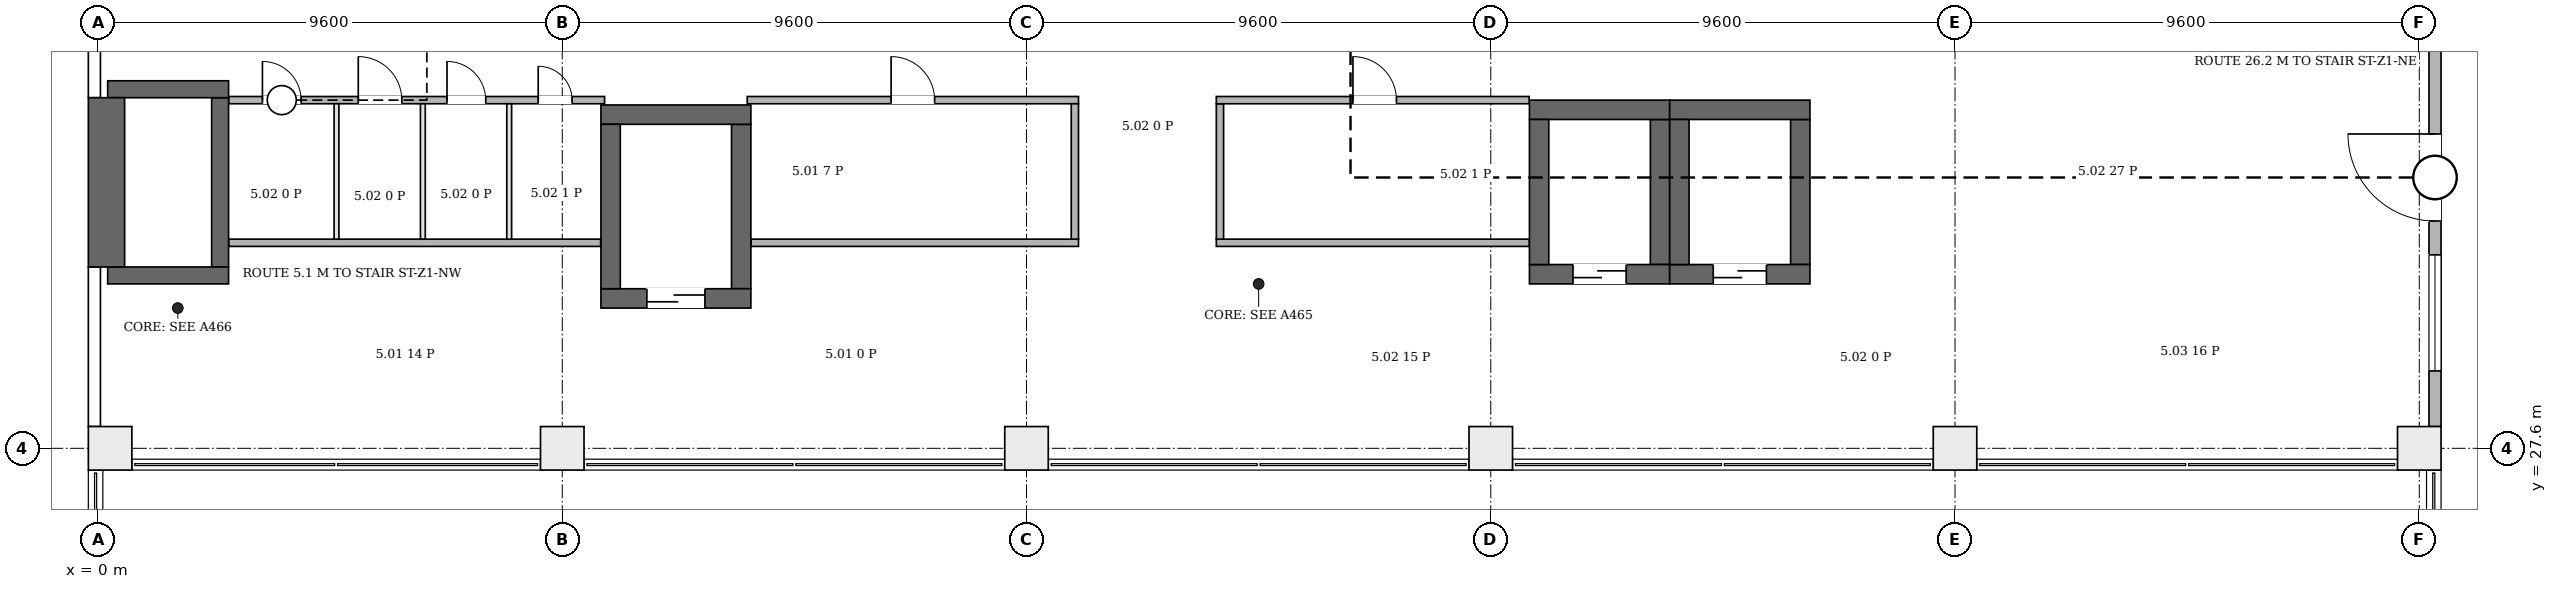
"""IFC4 building model, lengths in metres.
Left out: names, types, materials, properties, quantities, classifications, styles, units other than length and angle.
Written with IfcOpenShell. Run it as: python <this file> out.ifc"""

import sys

from ifc_helpers import new_model, si_unit, direction, frame, frame_2d, origin, origin_2d, place, context, subcontext, project, spatial, rectangle, extrude, element, fill, save


model = new_model("IFC4")
c1 = context("Model", 3, precision=1e-05, world=origin(), true_north=direction((0.0, 1.0)))
c2 = subcontext(c1, "Body", "Model", "MODEL_VIEW")
j1 = project(units=[si_unit("LENGTHUNIT", "METRE"), si_unit("PLANEANGLEUNIT", "RADIAN")], contexts=[c1])
p1 = place(None, origin())
s1 = spatial("IfcSite", under=j1, at=p1, CompositionType="ELEMENT")
p2 = place(p1, origin())
s2 = spatial("IfcBuilding", under=s1, at=p2, CompositionType="ELEMENT")
p3 = place(p2, frame((0.0, 0.0, 31.9)))
s3 = spatial("IfcBuildingStorey", under=s2, at=p3, CompositionType="ELEMENT", Elevation=31.9)
for number, where, z_axis, x_axis in (
    (1, (0.2, 31.175, 0.0), (0.0, 0.0, 1.0), (1.0, 0.0, 0.0)),
    (2, (0.2, 35.025, 0.0), (0.0, 0.0, 1.0), (1.0, 0.0, 0.0)),
):
    element("IfcWall", number, at=place(p3, frame(where, z_axis=z_axis, x_axis=x_axis)), inside=s3, PredefinedType="SHEAR", context=c2, shape_type="SweptSolid", body=[
        extrude(rectangle(XDim=2.5, YDim=0.35, at=frame_2d((1.25, 0.0))), origin(), (0.0, 0.0, 1.0), 2.2),
    ])
p4 = place(p3, frame((0.176, 31.35, 0.0), z_axis=(0.0, 0.0, 1.0), x_axis=(0.0, 1.0, 0.0)))
e3 = element("IfcWall", 3, at=p4, inside=s3, PredefinedType="SHEAR", context=c2, shape_type="SweptSolid", body=[
    extrude(rectangle(XDim=3.5, YDim=0.75, at=frame_2d((1.75, 0.0))), origin(), (0.0, 0.0, 1.0), 2.2),
])
p5 = place(p3, frame((2.525, 31.35, 0.0), z_axis=(0.0, 0.0, 1.0), x_axis=(0.0, 1.0, 0.0)))
e4 = element("IfcWall", 4, at=p5, inside=s3, PredefinedType="SHEAR", context=c2, shape_type="SweptSolid", body=[
    extrude(rectangle(XDim=3.5, YDim=0.35, at=frame_2d((1.75, 0.0))), origin(), (0.0, 0.0, 1.0), 2.2),
])
p6 = place(p3, frame((10.4, 30.7, 0.0), z_axis=(0.0, 0.0, 1.0), x_axis=(1.0, 0.0, 0.0)))
e5 = element("IfcWall", 5, at=p6, inside=s3, PredefinedType="SHEAR", context=c2, shape_type="SweptSolid", body=[
    extrude(rectangle(XDim=3.1, YDim=0.4, at=frame_2d((1.55, 0.0))), origin(), (0.0, 0.0, 1.0), 4.2),
])
p7 = place(p6, frame((0.95, 0.0, 0.0)))
e6 = element("IfcOpeningElement", 6, at=p7, cuts=e5, PredefinedType="OPENING", context=c2, shape_type="SweptSolid", body=[
    extrude(rectangle(XDim=1.2, YDim=2.1, at=frame_2d((0.6, 1.05))), frame((0.0, 0.21, 0.0), z_axis=(0.0, -1.0, 0.0), x_axis=(1.0, 0.0, 0.0)), (0.0, 0.0, 1.0), 0.42),
])
p8 = place(p3, frame((10.4, 34.5, 0.0), z_axis=(0.0, 0.0, 1.0), x_axis=(1.0, 0.0, 0.0)))
e7 = element("IfcWall", 7, at=p8, inside=s3, PredefinedType="SHEAR", context=c2, shape_type="SweptSolid", body=[
    extrude(rectangle(XDim=3.1, YDim=0.4, at=frame_2d((1.55, 0.0))), origin(), (0.0, 0.0, 1.0), 4.2),
])
for number, where, z_axis, x_axis in (
    (8, (10.6, 30.9, 0.0), (0.0, 0.0, 1.0), (0.0, 1.0, 0.0)),
    (9, (13.3, 30.9, 0.0), (0.0, 0.0, 1.0), (0.0, 1.0, 0.0)),
):
    element("IfcWall", number, at=place(p3, frame(where, z_axis=z_axis, x_axis=x_axis)), inside=s3, PredefinedType="SHEAR", context=c2, shape_type="SweptSolid", body=[
        extrude(rectangle(XDim=3.4, YDim=0.4, at=frame_2d((1.7, 0.0))), origin(), (0.0, 0.0, 1.0), 4.2),
    ])
p9 = place(p3, frame((29.6, 31.2, 0.0), z_axis=(0.0, 0.0, 1.0), x_axis=(1.0, 0.0, 0.0)))
e10 = element("IfcWall", 10, at=p9, inside=s3, PredefinedType="SHEAR", context=c2, shape_type="SweptSolid", body=[
    extrude(rectangle(XDim=2.9, YDim=0.4, at=frame_2d((1.45, 0.0))), origin(), (0.0, 0.0, 1.0), 4.2),
])
p10 = place(p9, frame((0.9, 0.0, 0.0)))
e11 = element("IfcOpeningElement", 11, at=p10, cuts=e10, PredefinedType="OPENING", context=c2, shape_type="SweptSolid", body=[
    extrude(rectangle(XDim=1.1, YDim=2.1, at=frame_2d((0.55, 1.05))), frame((0.0, 0.21, 0.0), z_axis=(0.0, -1.0, 0.0), x_axis=(1.0, 0.0, 0.0)), (0.0, 0.0, 1.0), 0.42),
])
p11 = place(p3, frame((29.6, 34.6, 0.0), z_axis=(0.0, 0.0, 1.0), x_axis=(1.0, 0.0, 0.0)))
e12 = element("IfcWall", 12, at=p11, inside=s3, PredefinedType="SHEAR", context=c2, shape_type="SweptSolid", body=[
    extrude(rectangle(XDim=2.9, YDim=0.4, at=frame_2d((1.45, 0.0))), origin(), (0.0, 0.0, 1.0), 4.2),
])
for number, where, z_axis, x_axis in (
    (13, (29.8, 31.4, 0.0), (0.0, 0.0, 1.0), (0.0, 1.0, 0.0)),
    (14, (32.3, 31.4, 0.0), (0.0, 0.0, 1.0), (0.0, 1.0, 0.0)),
):
    element("IfcWall", number, at=place(p3, frame(where, z_axis=z_axis, x_axis=x_axis)), inside=s3, PredefinedType="SHEAR", context=c2, shape_type="SweptSolid", body=[
        extrude(rectangle(XDim=3.0, YDim=0.4, at=frame_2d((1.5, 0.0))), origin(), (0.0, 0.0, 1.0), 4.2),
    ])
p12 = place(p3, frame((32.5, 31.2, 0.0), z_axis=(0.0, 0.0, 1.0), x_axis=(1.0, 0.0, 0.0)))
e15 = element("IfcWall", 15, at=p12, inside=s3, PredefinedType="SHEAR", context=c2, shape_type="SweptSolid", body=[
    extrude(rectangle(XDim=2.9, YDim=0.4, at=frame_2d((1.45, 0.0))), origin(), (0.0, 0.0, 1.0), 4.2),
])
p13 = place(p12, frame((0.9, 0.0, 0.0)))
e16 = element("IfcOpeningElement", 16, at=p13, cuts=e15, PredefinedType="OPENING", context=c2, shape_type="SweptSolid", body=[
    extrude(rectangle(XDim=1.1, YDim=2.1, at=frame_2d((0.55, 1.05))), frame((0.0, 0.21, 0.0), z_axis=(0.0, -1.0, 0.0), x_axis=(1.0, 0.0, 0.0)), (0.0, 0.0, 1.0), 0.42),
])
p14 = place(p3, frame((32.5, 34.6, 0.0), z_axis=(0.0, 0.0, 1.0), x_axis=(1.0, 0.0, 0.0)))
e17 = element("IfcWall", 17, at=p14, inside=s3, PredefinedType="SHEAR", context=c2, shape_type="SweptSolid", body=[
    extrude(rectangle(XDim=2.9, YDim=0.4, at=frame_2d((1.45, 0.0))), origin(), (0.0, 0.0, 1.0), 4.2),
])
for number, where, z_axis, x_axis in (
    (18, (32.7, 31.4, 0.0), (0.0, 0.0, 1.0), (0.0, 1.0, 0.0)),
    (19, (35.2, 31.4, 0.0), (0.0, 0.0, 1.0), (0.0, 1.0, 0.0)),
):
    element("IfcWall", number, at=place(p3, frame(where, z_axis=z_axis, x_axis=x_axis)), inside=s3, PredefinedType="SHEAR", context=c2, shape_type="SweptSolid", body=[
        extrude(rectangle(XDim=3.0, YDim=0.4, at=frame_2d((1.5, 0.0))), origin(), (0.0, 0.0, 1.0), 4.2),
    ])
for number, where, z_axis, x_axis in (
    (20, (0.25, 27.6, 0.0), (0.0, 0.0, 1.0), (1.0, 0.0, 0.0)),
    (21, (9.6, 27.6, 0.0), (0.0, 0.0, 1.0), (1.0, 0.0, 0.0)),
    (22, (19.2, 27.6, 0.0), (0.0, 0.0, 1.0), (1.0, 0.0, 0.0)),
    (23, (28.8, 27.6, 0.0), (0.0, 0.0, 1.0), (1.0, 0.0, 0.0)),
    (24, (38.4, 27.6, 0.0), (0.0, 0.0, 1.0), (1.0, 0.0, 0.0)),
    (25, (48.0, 27.6, 0.0), (0.0, 0.0, 1.0), (1.0, 0.0, 0.0)),
):
    element("IfcColumn", number, at=place(p3, frame(where, z_axis=z_axis, x_axis=x_axis)), inside=s3, PredefinedType="COLUMN", context=c2, shape_type="SweptSolid", body=[
        extrude(rectangle(XDim=0.9, YDim=0.9, at=origin_2d()), origin(), (0.0, 0.0, 1.0), 4.2),
    ])
p15 = place(p3, frame((-0.074, 31.35, 0.0), z_axis=(0.0, 0.0, 1.0), x_axis=(0.0, -1.0, 0.0)))
e26 = element("IfcWall", 26, at=p15, inside=s3, PredefinedType="ELEMENTEDWALL", context=c2, shape_type="SweptSolid", body=[
    extrude(rectangle(XDim=3.3, YDim=0.25, at=frame_2d((1.65, 0.0))), origin(), (0.0, 0.0, 1.0), 3.9),
])
p16 = place(p3, frame((-0.074, 36.35, 0.0), z_axis=(0.0, 0.0, 1.0), x_axis=(0.0, -1.0, 0.0)))
e27 = element("IfcWall", 27, at=p16, inside=s3, PredefinedType="ELEMENTEDWALL", context=c2, shape_type="SweptSolid", body=[
    extrude(rectangle(XDim=1.5, YDim=0.25, at=frame_2d((0.75, 0.0))), origin(), (0.0, 0.0, 1.0), 3.9),
])
p17 = place(p3, frame((48.325, 28.05, 0.0), z_axis=(0.0, 0.0, 1.0), x_axis=(0.0, 1.0, 0.0)))
e28 = element("IfcWall", 28, at=p17, inside=s3, PredefinedType="ELEMENTEDWALL", context=c2, shape_type="SweptSolid", body=[
    extrude(rectangle(XDim=8.3, YDim=0.25, at=frame_2d((4.15, 0.0))), origin(), (0.0, 0.0, 1.0), 3.9),
])
p18 = place(p17, frame((4.25, 0.0, 0.0)))
e29 = element("IfcOpeningElement", 29, at=p18, cuts=e28, PredefinedType="OPENING", context=c2, shape_type="SweptSolid", body=[
    extrude(rectangle(XDim=1.8, YDim=2.4, at=frame_2d((0.9, 1.2))), frame((0.0, 0.135, 0.0), z_axis=(0.0, -1.0, 0.0), x_axis=(1.0, 0.0, 0.0)), (0.0, 0.0, 1.0), 0.27),
])
p19 = place(p17, frame((1.15, 0.0, 0.9)))
e30 = element("IfcOpeningElement", 30, at=p19, cuts=e28, PredefinedType="OPENING", context=c2, shape_type="SweptSolid", body=[
    extrude(rectangle(XDim=2.4, YDim=2.6, at=frame_2d((1.2, 1.3))), frame((0.0, 0.135, 0.0), z_axis=(0.0, -1.0, 0.0), x_axis=(1.0, 0.0, 0.0)), (0.0, 0.0, 1.0), 0.27),
])
p20 = place(p3, frame((2.706, 31.85, 0.0), z_axis=(0.0, 0.0, 1.0), x_axis=(1.0, 0.0, 0.0)))
e31 = element("IfcWall", 31, at=p20, inside=s3, PredefinedType="PARTITIONING", context=c2, shape_type="SweptSolid", body=[
    extrude(rectangle(XDim=7.688, YDim=0.15, at=frame_2d((3.844, 0.0))), origin(), (0.0, 0.0, 1.0), 3.9),
])
p21 = place(p3, frame((2.706, 34.8, 0.0), z_axis=(0.0, 0.0, 1.0), x_axis=(1.0, 0.0, 0.0)))
e32 = element("IfcWall", 32, at=p21, inside=s3, PredefinedType="PARTITIONING", context=c2, shape_type="SweptSolid", body=[
    extrude(rectangle(XDim=7.769, YDim=0.15, at=frame_2d((3.885, 0.0))), origin(), (0.0, 0.0, 1.0), 3.9),
])
p22 = place(p21, frame((0.694, 0.0, 0.0)))
e33 = element("IfcOpeningElement", 33, at=p22, cuts=e32, PredefinedType="OPENING", context=c2, shape_type="SweptSolid", body=[
    extrude(rectangle(XDim=0.8, YDim=2.1, at=frame_2d((0.4, 1.05))), frame((0.0, 0.085, 0.0), z_axis=(0.0, -1.0, 0.0), x_axis=(1.0, 0.0, 0.0)), (0.0, 0.0, 1.0), 0.17),
])
p23 = place(p21, frame((2.676, 0.0, 0.0)))
e34 = element("IfcOpeningElement", 34, at=p23, cuts=e32, PredefinedType="OPENING", context=c2, shape_type="SweptSolid", body=[
    extrude(rectangle(XDim=0.9, YDim=2.1, at=frame_2d((0.45, 1.05))), frame((0.0, 0.085, 0.0), z_axis=(0.0, -1.0, 0.0), x_axis=(1.0, 0.0, 0.0)), (0.0, 0.0, 1.0), 0.17),
])
p24 = place(p21, frame((4.511, 0.0, 0.0)))
e35 = element("IfcOpeningElement", 35, at=p24, cuts=e32, PredefinedType="OPENING", context=c2, shape_type="SweptSolid", body=[
    extrude(rectangle(XDim=0.8, YDim=2.1, at=frame_2d((0.4, 1.05))), frame((0.0, 0.085, 0.0), z_axis=(0.0, -1.0, 0.0), x_axis=(1.0, 0.0, 0.0)), (0.0, 0.0, 1.0), 0.17),
])
p25 = place(p21, frame((6.397, 0.0, 0.0)))
e36 = element("IfcOpeningElement", 36, at=p25, cuts=e32, PredefinedType="OPENING", context=c2, shape_type="SweptSolid", body=[
    extrude(rectangle(XDim=0.7, YDim=2.1, at=frame_2d((0.35, 1.05))), frame((0.0, 0.085, 0.0), z_axis=(0.0, -1.0, 0.0), x_axis=(1.0, 0.0, 0.0)), (0.0, 0.0, 1.0), 0.17),
])
for number, where, z_axis, x_axis in (
    (37, (4.932, 31.925, 0.0), (0.0, 0.0, 1.0), (0.0, 1.0, 0.0)),
    (38, (6.717, 31.925, 0.0), (0.0, 0.0, 1.0), (0.0, 1.0, 0.0)),
    (39, (8.503, 31.925, 0.0), (0.0, 0.0, 1.0), (0.0, 1.0, 0.0)),
):
    element("IfcWall", number, at=place(p3, frame(where, z_axis=z_axis, x_axis=x_axis)), inside=s3, PredefinedType="PARTITIONING", context=c2, shape_type="SweptSolid", body=[
        extrude(rectangle(XDim=2.8, YDim=0.1, at=frame_2d((1.4, 0.0))), origin(), (0.0, 0.0, 1.0), 3.9),
    ])
p26 = place(p3, frame((13.425, 34.8, 0.0), z_axis=(0.0, 0.0, 1.0), x_axis=(1.0, 0.0, 0.0)))
e40 = element("IfcWall", 40, at=p26, inside=s3, PredefinedType="PARTITIONING", context=c2, shape_type="SweptSolid", body=[
    extrude(rectangle(XDim=6.85, YDim=0.15, at=frame_2d((3.425, 0.0))), origin(), (0.0, 0.0, 1.0), 3.9),
])
p27 = place(p26, frame((2.975, 0.0, 0.0)))
e41 = element("IfcOpeningElement", 41, at=p27, cuts=e40, PredefinedType="OPENING", context=c2, shape_type="SweptSolid", body=[
    extrude(rectangle(XDim=0.9, YDim=2.1, at=frame_2d((0.45, 1.05))), frame((0.0, 0.085, 0.0), z_axis=(0.0, -1.0, 0.0), x_axis=(1.0, 0.0, 0.0)), (0.0, 0.0, 1.0), 0.17),
])
p28 = place(p3, frame((13.506, 31.85, 0.0), z_axis=(0.0, 0.0, 1.0), x_axis=(1.0, 0.0, 0.0)))
e42 = element("IfcWall", 42, at=p28, inside=s3, PredefinedType="PARTITIONING", context=c2, shape_type="SweptSolid", body=[
    extrude(rectangle(XDim=6.769, YDim=0.15, at=frame_2d((3.384, 0.0))), origin(), (0.0, 0.0, 1.0), 3.9),
])
p29 = place(p3, frame((20.2, 31.925, 0.0), z_axis=(0.0, 0.0, 1.0), x_axis=(0.0, 1.0, 0.0)))
e43 = element("IfcWall", 43, at=p29, inside=s3, PredefinedType="PARTITIONING", context=c2, shape_type="SweptSolid", body=[
    extrude(rectangle(XDim=2.8, YDim=0.15, at=frame_2d((1.4, 0.0))), origin(), (0.0, 0.0, 1.0), 3.9),
])
p30 = place(p3, frame((23.125, 31.85, 0.0), z_axis=(0.0, 0.0, 1.0), x_axis=(1.0, 0.0, 0.0)))
e44 = element("IfcWall", 44, at=p30, inside=s3, PredefinedType="PARTITIONING", context=c2, shape_type="SweptSolid", body=[
    extrude(rectangle(XDim=6.469, YDim=0.15, at=frame_2d((3.234, 0.0))), origin(), (0.0, 0.0, 1.0), 3.9),
])
p31 = place(p3, frame((23.2, 31.925, 0.0), z_axis=(0.0, 0.0, 1.0), x_axis=(0.0, 1.0, 0.0)))
e45 = element("IfcWall", 45, at=p31, inside=s3, PredefinedType="PARTITIONING", context=c2, shape_type="SweptSolid", body=[
    extrude(rectangle(XDim=2.8, YDim=0.15, at=frame_2d((1.4, 0.0))), origin(), (0.0, 0.0, 1.0), 3.9),
])
p32 = place(p3, frame((23.125, 34.8, 0.0), z_axis=(0.0, 0.0, 1.0), x_axis=(1.0, 0.0, 0.0)))
e46 = element("IfcWall", 46, at=p32, inside=s3, PredefinedType="PARTITIONING", context=c2, shape_type="SweptSolid", body=[
    extrude(rectangle(XDim=6.469, YDim=0.15, at=frame_2d((3.234, 0.0))), origin(), (0.0, 0.0, 1.0), 3.9),
])
p33 = place(p32, frame((2.825, 0.0, 0.0)))
e47 = element("IfcOpeningElement", 47, at=p33, cuts=e46, PredefinedType="OPENING", context=c2, shape_type="SweptSolid", body=[
    extrude(rectangle(XDim=0.9, YDim=2.1, at=frame_2d((0.45, 1.05))), frame((0.0, 0.085, 0.0), z_axis=(0.0, -1.0, 0.0), x_axis=(1.0, 0.0, 0.0)), (0.0, 0.0, 1.0), 0.17),
])
p34 = place(p18, frame((1.8, 0.0, 0.0), z_axis=(0.0, 0.0, 1.0), x_axis=(-1.0, 0.0, 0.0)))
e48 = element("IfcDoor", 48, at=p34, inside=s3, OperationType="DOUBLE_DOOR_SINGLE_SWING", PredefinedType="DOOR", context=c2, shape_type="SweptSolid", body=[
    extrude(rectangle(XDim=1.8, YDim=2.4, at=frame_2d((0.9, 1.2))), frame((0.0, 0.025, 0.0), z_axis=(0.0, -1.0, 0.0), x_axis=(1.0, 0.0, 0.0)), (0.0, 0.0, 1.0), 0.05),
])
fill(e29, e48)
p35 = place(p19, origin())
e49 = element("IfcWindow", 49, at=p35, inside=s3, PartitioningType="SINGLE_PANEL", PredefinedType="WINDOW", context=c2, shape_type="SweptSolid", body=[
    extrude(rectangle(XDim=2.4, YDim=2.6, at=frame_2d((1.2, 1.3))), frame((0.0, 0.03, 0.0), z_axis=(0.0, -1.0, 0.0), x_axis=(1.0, 0.0, 0.0)), (0.0, 0.0, 1.0), 0.06),
])
fill(e30, e49)
p36 = place(p7, origin())
e50 = element("IfcDoor", 50, at=p36, inside=s3, OperationType="DOUBLE_DOOR_SLIDING", PredefinedType="DOOR", context=c2, shape_type="SweptSolid", body=[
    extrude(rectangle(XDim=1.2, YDim=2.1, at=frame_2d((0.6, 1.05))), frame((0.0, 0.025, 0.0), z_axis=(0.0, -1.0, 0.0), x_axis=(1.0, 0.0, 0.0)), (0.0, 0.0, 1.0), 0.05),
])
fill(e6, e50)
p37 = place(p10, origin())
e51 = element("IfcDoor", 51, at=p37, inside=s3, OperationType="DOUBLE_DOOR_SLIDING", PredefinedType="DOOR", context=c2, shape_type="SweptSolid", body=[
    extrude(rectangle(XDim=1.1, YDim=2.1, at=frame_2d((0.55, 1.05))), frame((0.0, 0.025, 0.0), z_axis=(0.0, -1.0, 0.0), x_axis=(1.0, 0.0, 0.0)), (0.0, 0.0, 1.0), 0.05),
])
fill(e11, e51)
p38 = place(p13, origin())
e52 = element("IfcDoor", 52, at=p38, inside=s3, OperationType="DOUBLE_DOOR_SLIDING", PredefinedType="DOOR", context=c2, shape_type="SweptSolid", body=[
    extrude(rectangle(XDim=1.1, YDim=2.1, at=frame_2d((0.55, 1.05))), frame((0.0, 0.025, 0.0), z_axis=(0.0, -1.0, 0.0), x_axis=(1.0, 0.0, 0.0)), (0.0, 0.0, 1.0), 0.05),
])
fill(e16, e52)
p39 = place(p22, origin())
e53 = element("IfcDoor", 53, at=p39, inside=s3, OperationType="SINGLE_SWING_RIGHT", PredefinedType="DOOR", context=c2, shape_type="SweptSolid", body=[
    extrude(rectangle(XDim=0.8, YDim=2.1, at=frame_2d((0.4, 1.05))), frame((0.0, 0.025, 0.0), z_axis=(0.0, -1.0, 0.0), x_axis=(1.0, 0.0, 0.0)), (0.0, 0.0, 1.0), 0.05),
])
fill(e33, e53)
p40 = place(p23, origin())
e54 = element("IfcDoor", 54, at=p40, inside=s3, OperationType="SINGLE_SWING_RIGHT", PredefinedType="DOOR", context=c2, shape_type="SweptSolid", body=[
    extrude(rectangle(XDim=0.9, YDim=2.1, at=frame_2d((0.45, 1.05))), frame((0.0, 0.025, 0.0), z_axis=(0.0, -1.0, 0.0), x_axis=(1.0, 0.0, 0.0)), (0.0, 0.0, 1.0), 0.05),
])
fill(e34, e54)
p41 = place(p24, origin())
e55 = element("IfcDoor", 55, at=p41, inside=s3, OperationType="SINGLE_SWING_RIGHT", PredefinedType="DOOR", context=c2, shape_type="SweptSolid", body=[
    extrude(rectangle(XDim=0.8, YDim=2.1, at=frame_2d((0.4, 1.05))), frame((0.0, 0.025, 0.0), z_axis=(0.0, -1.0, 0.0), x_axis=(1.0, 0.0, 0.0)), (0.0, 0.0, 1.0), 0.05),
])
fill(e35, e55)
p42 = place(p25, origin())
e56 = element("IfcDoor", 56, at=p42, inside=s3, OperationType="SINGLE_SWING_LEFT", PredefinedType="DOOR", context=c2, shape_type="SweptSolid", body=[
    extrude(rectangle(XDim=0.7, YDim=2.1, at=frame_2d((0.35, 1.05))), frame((0.0, 0.025, 0.0), z_axis=(0.0, -1.0, 0.0), x_axis=(1.0, 0.0, 0.0)), (0.0, 0.0, 1.0), 0.05),
])
fill(e36, e56)
p43 = place(p27, origin())
e57 = element("IfcDoor", 57, at=p43, inside=s3, OperationType="SINGLE_SWING_RIGHT", PredefinedType="DOOR", context=c2, shape_type="SweptSolid", body=[
    extrude(rectangle(XDim=0.9, YDim=2.1, at=frame_2d((0.45, 1.05))), frame((0.0, 0.025, 0.0), z_axis=(0.0, -1.0, 0.0), x_axis=(1.0, 0.0, 0.0)), (0.0, 0.0, 1.0), 0.05),
])
fill(e41, e57)
p44 = place(p33, origin())
e58 = element("IfcDoor", 58, at=p44, inside=s3, OperationType="SINGLE_SWING_LEFT", PredefinedType="DOOR", context=c2, shape_type="SweptSolid", body=[
    extrude(rectangle(XDim=0.9, YDim=2.1, at=frame_2d((0.45, 1.05))), frame((0.0, 0.025, 0.0), z_axis=(0.0, -1.0, 0.0), x_axis=(1.0, 0.0, 0.0)), (0.0, 0.0, 1.0), 0.05),
])
fill(e47, e58)
save(model, sys.argv[1])
